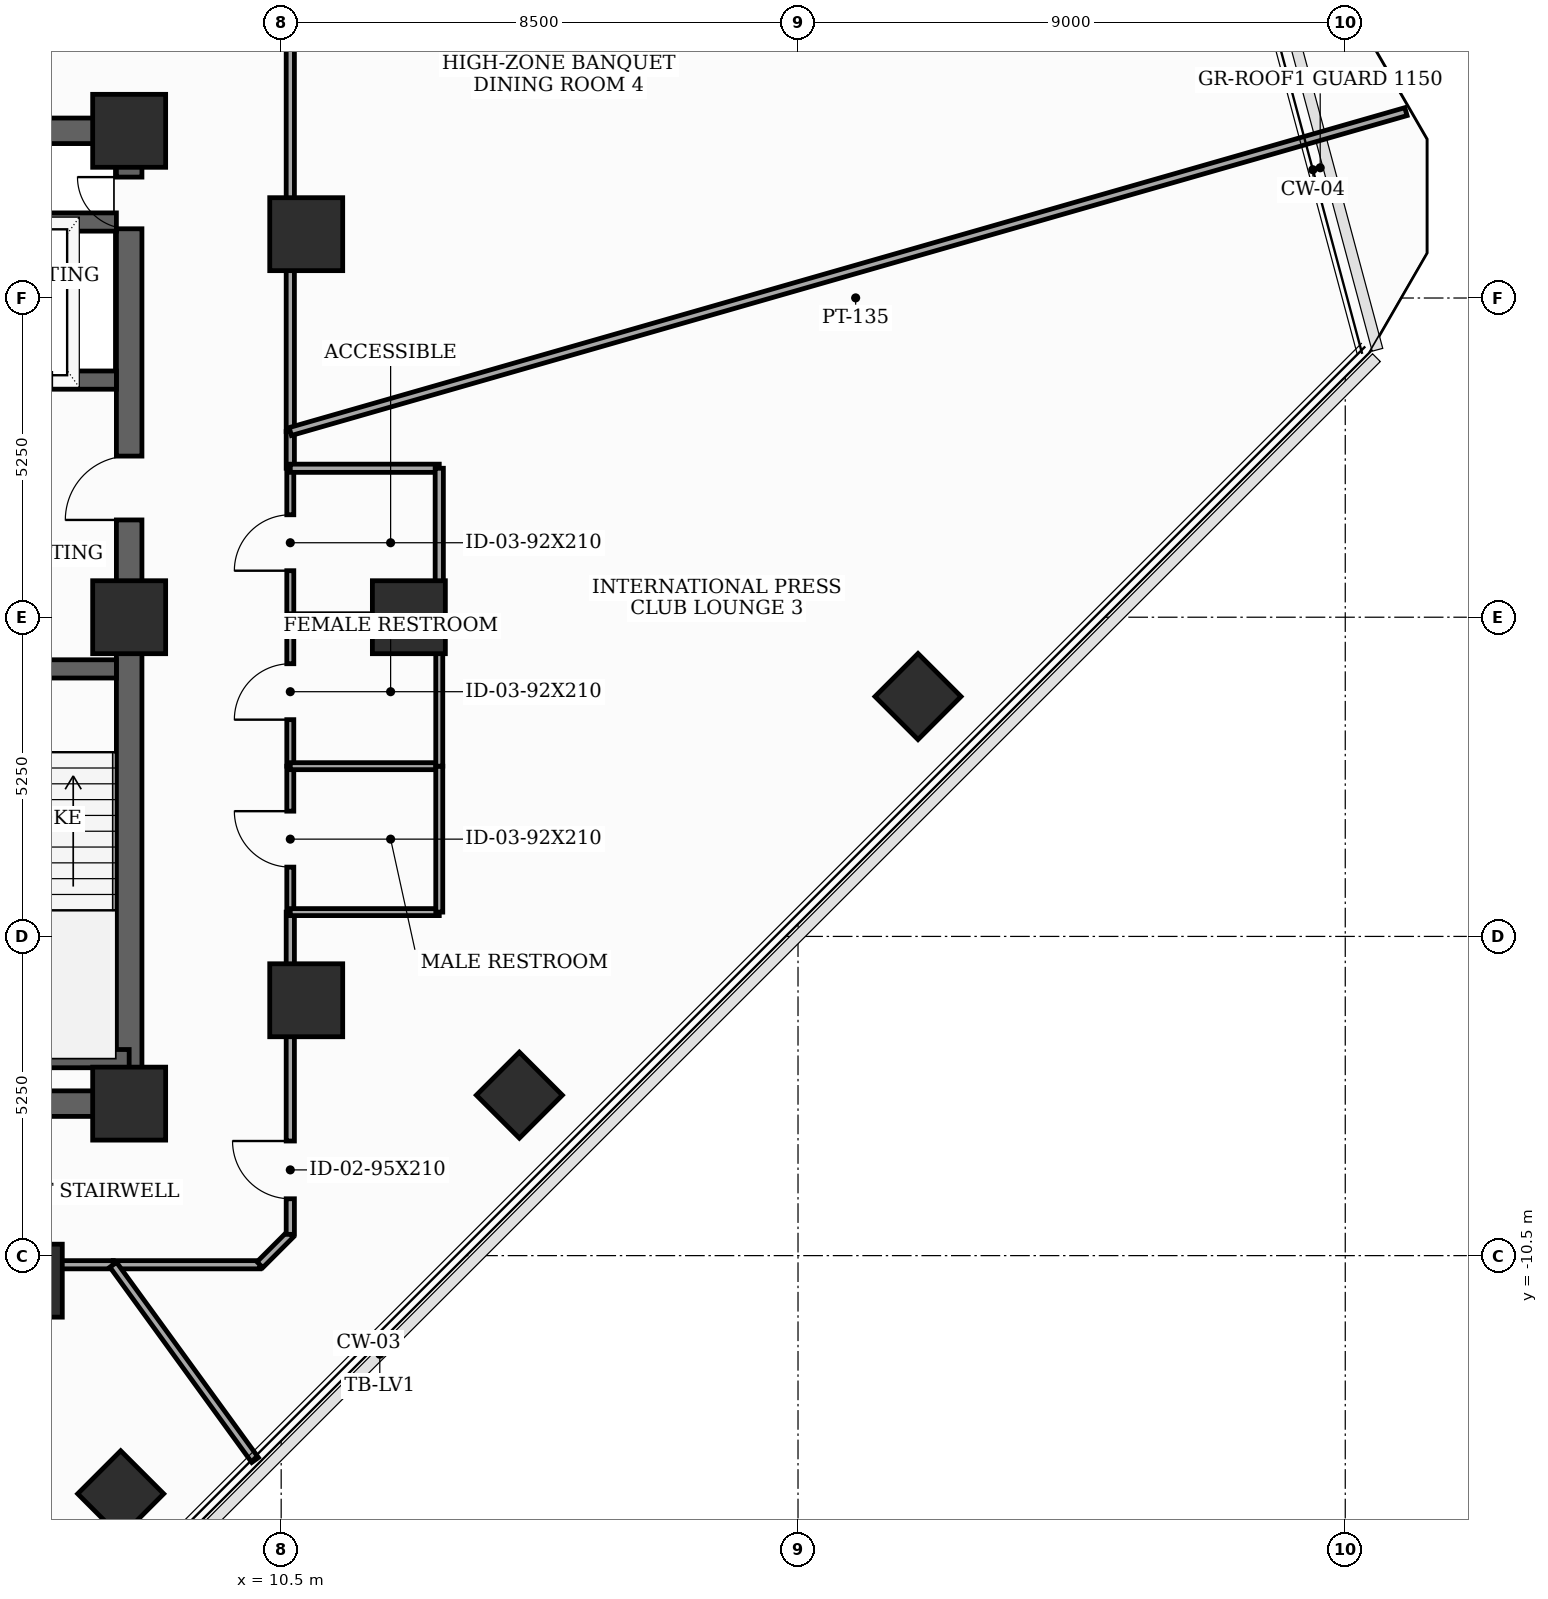
"""IFC4 building model, lengths in metres.
Left out: names, types, materials, properties, quantities, classifications, styles, units other than length and angle.
Written with IfcOpenShell. Run it as: python <this file> out.ifc"""

import sys

from ifc_helpers import new_model, si_unit, direction, frame, frame_2d, origin, origin_2d, place, context, subcontext, project, spatial, rectangle, extrude, element, fill, save


model = new_model("IFC4")
c1 = context("Model", 3, precision=1e-05, world=origin(), true_north=direction((0.0, 1.0)))
c2 = subcontext(c1, "Body", "Model", "MODEL_VIEW")
j1 = project(units=[si_unit("LENGTHUNIT", "METRE"), si_unit("PLANEANGLEUNIT", "RADIAN")], contexts=[c1])
p1 = place(None, origin())
s1 = spatial("IfcSite", under=j1, at=p1, CompositionType="ELEMENT")
p2 = place(p1, origin())
s2 = spatial("IfcBuilding", under=s1, at=p2, CompositionType="ELEMENT")
p3 = place(p2, frame((0.0, 0.0, 210.1)))
s3 = spatial("IfcBuildingStorey", under=s2, at=p3, CompositionType="ELEMENT", Elevation=210.1)
for number, where, z_axis, x_axis in (
    (1, (8.0, -8.0, 0.0), (0.0, 0.0, 1.0), (1.0, 0.0, 0.0)),
    (2, (8.0, 0.0, 0.0), (0.0, 0.0, 1.0), (1.0, 0.0, 0.0)),
    (3, (8.0, 8.0, 0.0), (0.0, 0.0, 1.0), (1.0, 0.0, 0.0)),
    (4, (12.6, 0.0, 0.0), (0.0, 0.0, 1.0), (1.0, 0.0, 0.0)),
    (5, (10.912, 6.3, 0.0), (0.0, 0.0, 1.0), (1.0, 0.0, 0.0)),
    (6, (6.3, -10.912, 0.0), (0.0, 0.0, 1.0), (1.0, 0.0, 0.0)),
    (7, (10.912, -6.3, 0.0), (0.0, 0.0, 1.0), (1.0, 0.0, 0.0)),
):
    element("IfcColumn", number, at=place(p3, frame(where, z_axis=z_axis, x_axis=x_axis)), inside=s3, PredefinedType="COLUMN", context=c2, shape_type="SweptSolid", body=[
        extrude(rectangle(XDim=1.2, YDim=1.2, at=origin_2d()), origin(), (0.0, 0.0, 1.0), 3.7),
    ])
for number, where, z_axis, x_axis in (
    (8, (7.861, -14.417, 0.0), (0.0, 0.0, 1.0), (0.707, 0.707, 0.0)),
    (9, (14.417, -7.861, 0.0), (0.0, 0.0, 1.0), (0.707, 0.707, 0.0)),
    (10, (20.973, -1.305, 0.0), (0.0, 0.0, 1.0), (0.707, 0.707, 0.0)),
):
    element("IfcColumn", number, at=place(p3, frame(where, z_axis=z_axis, x_axis=x_axis)), inside=s3, PredefinedType="COLUMN", context=c2, shape_type="SweptSolid", body=[
        extrude(rectangle(XDim=1.0, YDim=1.0, at=origin_2d()), origin(), (0.0, 0.0, 1.0), 3.7),
    ])
p4 = place(p3, frame((8.0, -8.0, 0.0), z_axis=(0.0, 0.0, 1.0), x_axis=(0.0, 1.0, 0.0)))
e11 = element("IfcWall", 11, at=p4, inside=s3, PredefinedType="SHEAR", context=c2, shape_type="SweptSolid", body=[
    extrude(rectangle(XDim=16.0, YDim=0.42, at=frame_2d((8.0, 0.0))), origin(), (0.0, 0.0, 1.0), 3.46),
])
p5 = place(p4, frame((9.6, 0.0, 0.0)))
e12 = element("IfcOpeningElement", 12, at=p5, cuts=e11, PredefinedType="OPENING", context=c2, shape_type="SweptSolid", body=[
    extrude(rectangle(XDim=1.05, YDim=2.15, at=frame_2d((0.525, 1.075))), frame((0.0, 0.22, 0.0), z_axis=(0.0, -1.0, 0.0), x_axis=(1.0, 0.0, 0.0)), (0.0, 0.0, 1.0), 0.44),
])
p6 = place(p4, frame((14.389, 0.0, 0.0)))
e13 = element("IfcOpeningElement", 13, at=p6, cuts=e11, PredefinedType="OPENING", context=c2, shape_type="SweptSolid", body=[
    extrude(rectangle(XDim=0.85, YDim=2.02, at=frame_2d((0.425, 1.01))), frame((0.0, 0.22, 0.0), z_axis=(0.0, -1.0, 0.0), x_axis=(1.0, 0.0, 0.0)), (0.0, 0.0, 1.0), 0.44),
])
p7 = place(p3, frame((-8.0, -8.0, 0.0), z_axis=(0.0, 0.0, 1.0), x_axis=(1.0, 0.0, 0.0)))
e14 = element("IfcWall", 14, at=p7, inside=s3, PredefinedType="SHEAR", context=c2, shape_type="SweptSolid", body=[
    extrude(rectangle(XDim=16.0, YDim=0.42, at=frame_2d((8.0, 0.0))), origin(), (0.0, 0.0, 1.0), 3.46),
])
p8 = place(p7, frame((4.35, 0.0, 0.0)))
e15 = element("IfcOpeningElement", 15, at=p8, cuts=e14, PredefinedType="OPENING", context=c2, shape_type="SweptSolid", body=[
    extrude(rectangle(XDim=0.85, YDim=2.02, at=frame_2d((0.425, 1.01))), frame((0.0, 0.22, 0.0), z_axis=(0.0, -1.0, 0.0), x_axis=(1.0, 0.0, 0.0)), (0.0, 0.0, 1.0), 0.44),
])
p9 = place(p7, frame((6.49, 0.0, 0.0)))
e16 = element("IfcOpeningElement", 16, at=p9, cuts=e14, PredefinedType="OPENING", context=c2, shape_type="SweptSolid", body=[
    extrude(rectangle(XDim=0.85, YDim=2.02, at=frame_2d((0.425, 1.01))), frame((0.0, 0.22, 0.0), z_axis=(0.0, -1.0, 0.0), x_axis=(1.0, 0.0, 0.0)), (0.0, 0.0, 1.0), 0.44),
])
p10 = place(p7, frame((8.69, 0.0, 0.0)))
e17 = element("IfcOpeningElement", 17, at=p10, cuts=e14, PredefinedType="OPENING", context=c2, shape_type="SweptSolid", body=[
    extrude(rectangle(XDim=0.85, YDim=2.02, at=frame_2d((0.425, 1.01))), frame((0.0, 0.22, 0.0), z_axis=(0.0, -1.0, 0.0), x_axis=(1.0, 0.0, 0.0)), (0.0, 0.0, 1.0), 0.44),
])
p11 = place(p7, frame((10.8, 0.0, 0.0)))
e18 = element("IfcOpeningElement", 18, at=p11, cuts=e14, PredefinedType="OPENING", context=c2, shape_type="SweptSolid", body=[
    extrude(rectangle(XDim=0.85, YDim=2.02, at=frame_2d((0.425, 1.01))), frame((0.0, 0.22, 0.0), z_axis=(0.0, -1.0, 0.0), x_axis=(1.0, 0.0, 0.0)), (0.0, 0.0, 1.0), 0.44),
])
p12 = place(p3, frame((-8.0, 8.0, 0.0), z_axis=(0.0, 0.0, 1.0), x_axis=(1.0, 0.0, 0.0)))
e19 = element("IfcWall", 19, at=p12, inside=s3, PredefinedType="SHEAR", context=c2, shape_type="SweptSolid", body=[
    extrude(rectangle(XDim=16.0, YDim=0.42, at=frame_2d((8.0, 0.0))), origin(), (0.0, 0.0, 1.0), 3.46),
])
p13 = place(p12, frame((7.1, 0.0, 0.0)))
e20 = element("IfcOpeningElement", 20, at=p13, cuts=e19, PredefinedType="OPENING", context=c2, shape_type="SweptSolid", body=[
    extrude(rectangle(XDim=1.8, YDim=2.15, at=frame_2d((0.9, 1.075))), frame((0.0, 0.22, 0.0), z_axis=(0.0, -1.0, 0.0), x_axis=(1.0, 0.0, 0.0)), (0.0, 0.0, 1.0), 0.44),
])
p14 = place(p3, frame((4.45, -0.85, 0.0), z_axis=(0.0, 0.0, 1.0), x_axis=(1.0, 0.0, 0.0)))
e21 = element("IfcWall", 21, at=p14, inside=s3, PredefinedType="SHEAR", context=c2, shape_type="SweptSolid", body=[
    extrude(rectangle(XDim=3.34, YDim=0.3, at=frame_2d((1.67, 0.0))), origin(), (0.0, 0.0, 1.0), 3.46),
])
p15 = place(p14, frame((0.65, 0.0, 0.0)))
e22 = element("IfcOpeningElement", 22, at=p15, cuts=e21, PredefinedType="OPENING", context=c2, shape_type="SweptSolid", body=[
    extrude(rectangle(XDim=1.05, YDim=2.15, at=frame_2d((0.525, 1.075))), frame((0.0, 0.16, 0.0), z_axis=(0.0, -1.0, 0.0), x_axis=(1.0, 0.0, 0.0)), (0.0, 0.0, 1.0), 0.32),
])
p16 = place(p3, frame((4.45, -7.26, 0.0), z_axis=(0.0, 0.0, 1.0), x_axis=(1.0, 0.0, 0.0)))
e23 = element("IfcWall", 23, at=p16, inside=s3, PredefinedType="SHEAR", context=c2, shape_type="SweptSolid", body=[
    extrude(rectangle(XDim=3.55, YDim=0.3, at=frame_2d((1.775, 0.0))), origin(), (0.0, 0.0, 1.0), 3.46),
])
p17 = place(p3, frame((4.45, 3.9, 0.0), z_axis=(0.0, 0.0, 1.0), x_axis=(1.0, 0.0, 0.0)))
e24 = element("IfcWall", 24, at=p17, inside=s3, PredefinedType="SHEAR", context=c2, shape_type="SweptSolid", body=[
    extrude(rectangle(XDim=3.34, YDim=0.3, at=frame_2d((1.67, 0.0))), origin(), (0.0, 0.0, 1.0), 3.46),
])
p18 = place(p17, frame((1.18, 0.0, 0.0)))
e25 = element("IfcOpeningElement", 25, at=p18, cuts=e24, PredefinedType="OPENING", context=c2, shape_type="SweptSolid", body=[
    extrude(rectangle(XDim=1.1, YDim=2.1, at=frame_2d((0.55, 1.05))), frame((0.0, 0.16, 0.0), z_axis=(0.0, -1.0, 0.0), x_axis=(1.0, 0.0, 0.0)), (0.0, 0.0, 1.0), 0.32),
])
p19 = place(p3, frame((4.45, 6.5, 0.0), z_axis=(0.0, 0.0, 1.0), x_axis=(1.0, 0.0, 0.0)))
e26 = element("IfcWall", 26, at=p19, inside=s3, PredefinedType="SHEAR", context=c2, shape_type="SweptSolid", body=[
    extrude(rectangle(XDim=3.34, YDim=0.3, at=frame_2d((1.67, 0.0))), origin(), (0.0, 0.0, 1.0), 3.46),
])
p20 = place(p3, frame((-4.303, -10.65, 0.0), z_axis=(0.0, 0.0, 1.0), x_axis=(1.0, 0.0, 0.0)))
e27 = element("IfcWall", 27, at=p20, inside=s3, PredefinedType="PARTITIONING", context=c2, shape_type="SweptSolid", body=[
    extrude(rectangle(XDim=12.041, YDim=0.135, at=frame_2d((6.021, 0.0))), origin(), (0.0, 0.0, 1.0), 2.045),
])
p21 = place(p20, frame((5.545, 0.0, 0.0)))
e28 = element("IfcOpeningElement", 28, at=p21, cuts=e27, PredefinedType="OPENING", context=c2, shape_type="SweptSolid", body=[
    extrude(rectangle(XDim=0.95, YDim=2.0, at=frame_2d((0.475, 1.0))), frame((0.0, 0.077, 0.0), z_axis=(0.0, -1.0, 0.0), x_axis=(1.0, 0.0, 0.0)), (0.0, 0.0, 1.0), 0.155),
])
p22 = place(p3, frame((10.65, -4.85, 0.0), z_axis=(0.0, 0.0, 1.0), x_axis=(0.0, 1.0, 0.0)))
e29 = element("IfcWall", 29, at=p22, inside=s3, PredefinedType="PARTITIONING", context=c2, shape_type="SweptSolid", body=[
    extrude(rectangle(XDim=2.4, YDim=0.115, at=frame_2d((1.2, 0.0))), origin(), (0.0, 0.0, 1.0), 3.46),
])
p23 = place(p22, frame((0.74, 0.0, 0.0)))
e30 = element("IfcOpeningElement", 30, at=p23, cuts=e29, PredefinedType="OPENING", context=c2, shape_type="SweptSolid", body=[
    extrude(rectangle(XDim=0.92, YDim=2.1, at=frame_2d((0.46, 1.05))), frame((0.0, 0.067, 0.0), z_axis=(0.0, -1.0, 0.0), x_axis=(1.0, 0.0, 0.0)), (0.0, 0.0, 1.0), 0.135),
])
p24 = place(p3, frame((10.65, -2.45, 0.0), z_axis=(0.0, 0.0, 1.0), x_axis=(0.0, 1.0, 0.0)))
e31 = element("IfcWall", 31, at=p24, inside=s3, PredefinedType="PARTITIONING", context=c2, shape_type="SweptSolid", body=[
    extrude(rectangle(XDim=2.45, YDim=0.115, at=frame_2d((1.225, 0.0))), origin(), (0.0, 0.0, 1.0), 2.845),
])
p25 = place(p24, frame((0.765, 0.0, 0.0)))
e32 = element("IfcOpeningElement", 32, at=p25, cuts=e31, PredefinedType="OPENING", context=c2, shape_type="SweptSolid", body=[
    extrude(rectangle(XDim=0.92, YDim=2.1, at=frame_2d((0.46, 1.05))), frame((0.0, 0.067, 0.0), z_axis=(0.0, -1.0, 0.0), x_axis=(1.0, 0.0, 0.0)), (0.0, 0.0, 1.0), 0.135),
])
p26 = place(p3, frame((7.738, -10.65, 0.0), z_axis=(0.0, 0.0, 1.0), x_axis=(1.0, 0.0, 0.0)))
e33 = element("IfcWall", 33, at=p26, inside=s3, PredefinedType="PARTITIONING", context=c2, shape_type="SweptSolid", body=[
    extrude(rectangle(XDim=2.412, YDim=0.135, at=frame_2d((1.206, 0.0))), origin(), (0.0, 0.0, 1.0), 2.045),
])
p27 = place(p3, frame((10.15, -10.65, 0.0), z_axis=(0.0, 0.0, 1.0), x_axis=(0.707106781187, 0.707106781187, 0.0)))
e34 = element("IfcWall", 34, at=p27, inside=s3, PredefinedType="PARTITIONING", context=c2, shape_type="SweptSolid", body=[
    extrude(rectangle(XDim=0.707, YDim=0.135, at=frame_2d((0.354, 0.0))), origin(), (0.0, 0.0, 1.0), 3.46),
])
p28 = place(p3, frame((10.65, -10.15, 0.0), z_axis=(0.0, 0.0, 1.0), x_axis=(0.0, 1.0, 0.0)))
e35 = element("IfcWall", 35, at=p28, inside=s3, PredefinedType="PARTITIONING", context=c2, shape_type="SweptSolid", body=[
    extrude(rectangle(XDim=5.3, YDim=0.135, at=frame_2d((2.65, 0.0))), origin(), (0.0, 0.0, 1.0), 2.845),
])
p29 = place(p28, frame((0.585, 0.0, 0.0)))
e36 = element("IfcOpeningElement", 36, at=p29, cuts=e35, PredefinedType="OPENING", context=c2, shape_type="SweptSolid", body=[
    extrude(rectangle(XDim=0.95, YDim=2.1, at=frame_2d((0.475, 1.05))), frame((0.0, 0.077, 0.0), z_axis=(0.0, -1.0, 0.0), x_axis=(1.0, 0.0, 0.0)), (0.0, 0.0, 1.0), 0.155),
])
p30 = place(p3, frame((10.65, 2.45, 0.0), z_axis=(0.0, 0.0, 1.0), x_axis=(0.0, 1.0, 0.0)))
e37 = element("IfcWall", 37, at=p30, inside=s3, PredefinedType="PARTITIONING", context=c2, shape_type="SweptSolid", body=[
    extrude(rectangle(XDim=0.604, YDim=0.135, at=frame_2d((0.302, 0.0))), origin(), (0.0, 0.0, 1.0), 3.46),
])
p31 = place(p3, frame((10.65, 0.0, 0.0), z_axis=(0.0, 0.0, 1.0), x_axis=(0.0, 1.0, 0.0)))
e38 = element("IfcWall", 38, at=p31, inside=s3, PredefinedType="PARTITIONING", context=c2, shape_type="SweptSolid", body=[
    extrude(rectangle(XDim=2.45, YDim=0.115, at=frame_2d((1.225, 0.0))), origin(), (0.0, 0.0, 1.0), 2.845),
])
p32 = place(p31, frame((0.765, 0.0, 0.0)))
e39 = element("IfcOpeningElement", 39, at=p32, cuts=e38, PredefinedType="OPENING", context=c2, shape_type="SweptSolid", body=[
    extrude(rectangle(XDim=0.92, YDim=2.1, at=frame_2d((0.46, 1.05))), frame((0.0, 0.067, 0.0), z_axis=(0.0, -1.0, 0.0), x_axis=(1.0, 0.0, 0.0)), (0.0, 0.0, 1.0), 0.135),
])
p33 = place(p3, frame((10.65, 3.054, 0.0), z_axis=(0.0, 0.0, 1.0), x_axis=(0.0, 1.0, 0.0)))
e40 = element("IfcWall", 40, at=p33, inside=s3, PredefinedType="PARTITIONING", context=c2, shape_type="SweptSolid", body=[
    extrude(rectangle(XDim=7.096, YDim=0.135, at=frame_2d((3.548, 0.0))), origin(), (0.0, 0.0, 1.0), 2.045),
])
p34 = place(p3, frame((10.071, -13.862, 0.0), z_axis=(0.0, 0.0, 1.0), x_axis=(-0.587648644137, 0.80911622839, 0.0)))
e41 = element("IfcWall", 41, at=p34, inside=s3, PredefinedType="PARTITIONING", context=c2, shape_type="SweptSolid", body=[
    extrude(rectangle(XDim=3.97, YDim=0.135, at=frame_2d((1.985, 0.0))), origin(), (0.0, 0.0, 1.0), 2.045),
])
for number, where, z_axis, x_axis in (
    (42, (13.1, -2.45, 0.0), (0.0, 0.0, 1.0), (-1.0, 0.0, 0.0)),
    (43, (10.65, -4.85, 0.0), (0.0, 0.0, 1.0), (1.0, 0.0, 0.0)),
):
    element("IfcWall", number, at=place(p3, frame(where, z_axis=z_axis, x_axis=x_axis)), inside=s3, PredefinedType="PARTITIONING", context=c2, shape_type="SweptSolid", body=[
        extrude(rectangle(XDim=2.45, YDim=0.115, at=frame_2d((1.225, 0.0))), origin(), (0.0, 0.0, 1.0), 2.845),
    ])
p35 = place(p3, frame((13.1, -4.85, 0.0), z_axis=(0.0, 0.0, 1.0), x_axis=(0.0, 1.0, 0.0)))
e44 = element("IfcWall", 44, at=p35, inside=s3, PredefinedType="PARTITIONING", context=c2, shape_type="SweptSolid", body=[
    extrude(rectangle(XDim=2.4, YDim=0.115, at=frame_2d((1.2, 0.0))), origin(), (0.0, 0.0, 1.0), 3.46),
])
p36 = place(p3, frame((13.1, -2.45, 0.0), z_axis=(0.0, 0.0, 1.0), x_axis=(0.0, 1.0, 0.0)))
e45 = element("IfcWall", 45, at=p36, inside=s3, PredefinedType="PARTITIONING", context=c2, shape_type="SweptSolid", body=[
    extrude(rectangle(XDim=2.45, YDim=0.115, at=frame_2d((1.225, 0.0))), origin(), (0.0, 0.0, 1.0), 2.045),
])
p37 = place(p3, frame((13.1, 0.0, 0.0), z_axis=(0.0, 0.0, 1.0), x_axis=(-1.0, 0.0, 0.0)))
e46 = element("IfcWall", 46, at=p37, inside=s3, PredefinedType="PARTITIONING", context=c2, shape_type="SweptSolid", body=[
    extrude(rectangle(XDim=2.45, YDim=0.115, at=frame_2d((1.225, 0.0))), origin(), (0.0, 0.0, 1.0), 2.045),
])
p38 = place(p3, frame((10.65, 2.45, 0.0), z_axis=(0.0, 0.0, 1.0), x_axis=(1.0, 0.0, 0.0)))
e47 = element("IfcWall", 47, at=p38, inside=s3, PredefinedType="PARTITIONING", context=c2, shape_type="SweptSolid", body=[
    extrude(rectangle(XDim=2.45, YDim=0.135, at=frame_2d((1.225, 0.0))), origin(), (0.0, 0.0, 1.0), 2.845),
])
p39 = place(p3, frame((13.1, 2.45, 0.0), z_axis=(0.0, 0.0, 1.0), x_axis=(0.0, -1.0, 0.0)))
e48 = element("IfcWall", 48, at=p39, inside=s3, PredefinedType="PARTITIONING", context=c2, shape_type="SweptSolid", body=[
    extrude(rectangle(XDim=2.45, YDim=0.135, at=frame_2d((1.225, 0.0))), origin(), (0.0, 0.0, 1.0), 2.045),
])
p40 = place(p3, frame((28.998, 8.315, 0.0), z_axis=(0.0, 0.0, 1.0), x_axis=(-0.961257547597, -0.275651822392, 0.0)))
e49 = element("IfcWall", 49, at=p40, inside=s3, PredefinedType="PARTITIONING", context=c2, shape_type="SweptSolid", body=[
    extrude(rectangle(XDim=19.087, YDim=0.135, at=frame_2d((9.544, 0.0))), origin(), (0.0, 0.0, 1.0), 2.045),
])
p41 = place(p5, origin())
e50 = element("IfcDoor", 50, at=p41, inside=s3, OperationType="SINGLE_SWING_LEFT", PredefinedType="DOOR", context=c2, shape_type="SweptSolid", body=[
    extrude(rectangle(XDim=1.05, YDim=2.15, at=frame_2d((0.525, 1.075))), frame((0.0, 0.025, 0.0), z_axis=(0.0, -1.0, 0.0), x_axis=(1.0, 0.0, 0.0)), (0.0, 0.0, 1.0), 0.05),
])
fill(e12, e50)
p42 = place(p6, origin())
e51 = element("IfcDoor", 51, at=p42, inside=s3, OperationType="SINGLE_SWING_RIGHT", PredefinedType="TRAPDOOR", context=c2, shape_type="SweptSolid", body=[
    extrude(rectangle(XDim=0.85, YDim=2.02, at=frame_2d((0.425, 1.01))), frame((0.0, 0.025, 0.0), z_axis=(0.0, -1.0, 0.0), x_axis=(1.0, 0.0, 0.0)), (0.0, 0.0, 1.0), 0.05),
])
fill(e13, e51)
p43 = place(p23, origin())
e52 = element("IfcDoor", 52, at=p43, inside=s3, OperationType="SINGLE_SWING_RIGHT", PredefinedType="DOOR", context=c2, shape_type="SweptSolid", body=[
    extrude(rectangle(XDim=0.92, YDim=2.1, at=frame_2d((0.46, 1.05))), frame((0.0, 0.025, 0.0), z_axis=(0.0, -1.0, 0.0), x_axis=(1.0, 0.0, 0.0)), (0.0, 0.0, 1.0), 0.05),
])
fill(e30, e52)
p44 = place(p25, origin())
e53 = element("IfcDoor", 53, at=p44, inside=s3, OperationType="SINGLE_SWING_LEFT", PredefinedType="DOOR", context=c2, shape_type="SweptSolid", body=[
    extrude(rectangle(XDim=0.92, YDim=2.1, at=frame_2d((0.46, 1.05))), frame((0.0, 0.025, 0.0), z_axis=(0.0, -1.0, 0.0), x_axis=(1.0, 0.0, 0.0)), (0.0, 0.0, 1.0), 0.05),
])
fill(e32, e53)
p45 = place(p29, origin())
e54 = element("IfcDoor", 54, at=p45, inside=s3, OperationType="SINGLE_SWING_RIGHT", PredefinedType="DOOR", context=c2, shape_type="SweptSolid", body=[
    extrude(rectangle(XDim=0.95, YDim=2.1, at=frame_2d((0.475, 1.05))), frame((0.0, 0.025, 0.0), z_axis=(0.0, -1.0, 0.0), x_axis=(1.0, 0.0, 0.0)), (0.0, 0.0, 1.0), 0.05),
])
fill(e36, e54)
p46 = place(p32, origin())
e55 = element("IfcDoor", 55, at=p46, inside=s3, OperationType="SINGLE_SWING_LEFT", PredefinedType="DOOR", context=c2, shape_type="SweptSolid", body=[
    extrude(rectangle(XDim=0.92, YDim=2.1, at=frame_2d((0.46, 1.05))), frame((0.0, 0.025, 0.0), z_axis=(0.0, -1.0, 0.0), x_axis=(1.0, 0.0, 0.0)), (0.0, 0.0, 1.0), 0.05),
])
fill(e39, e55)
save(model, sys.argv[1])
